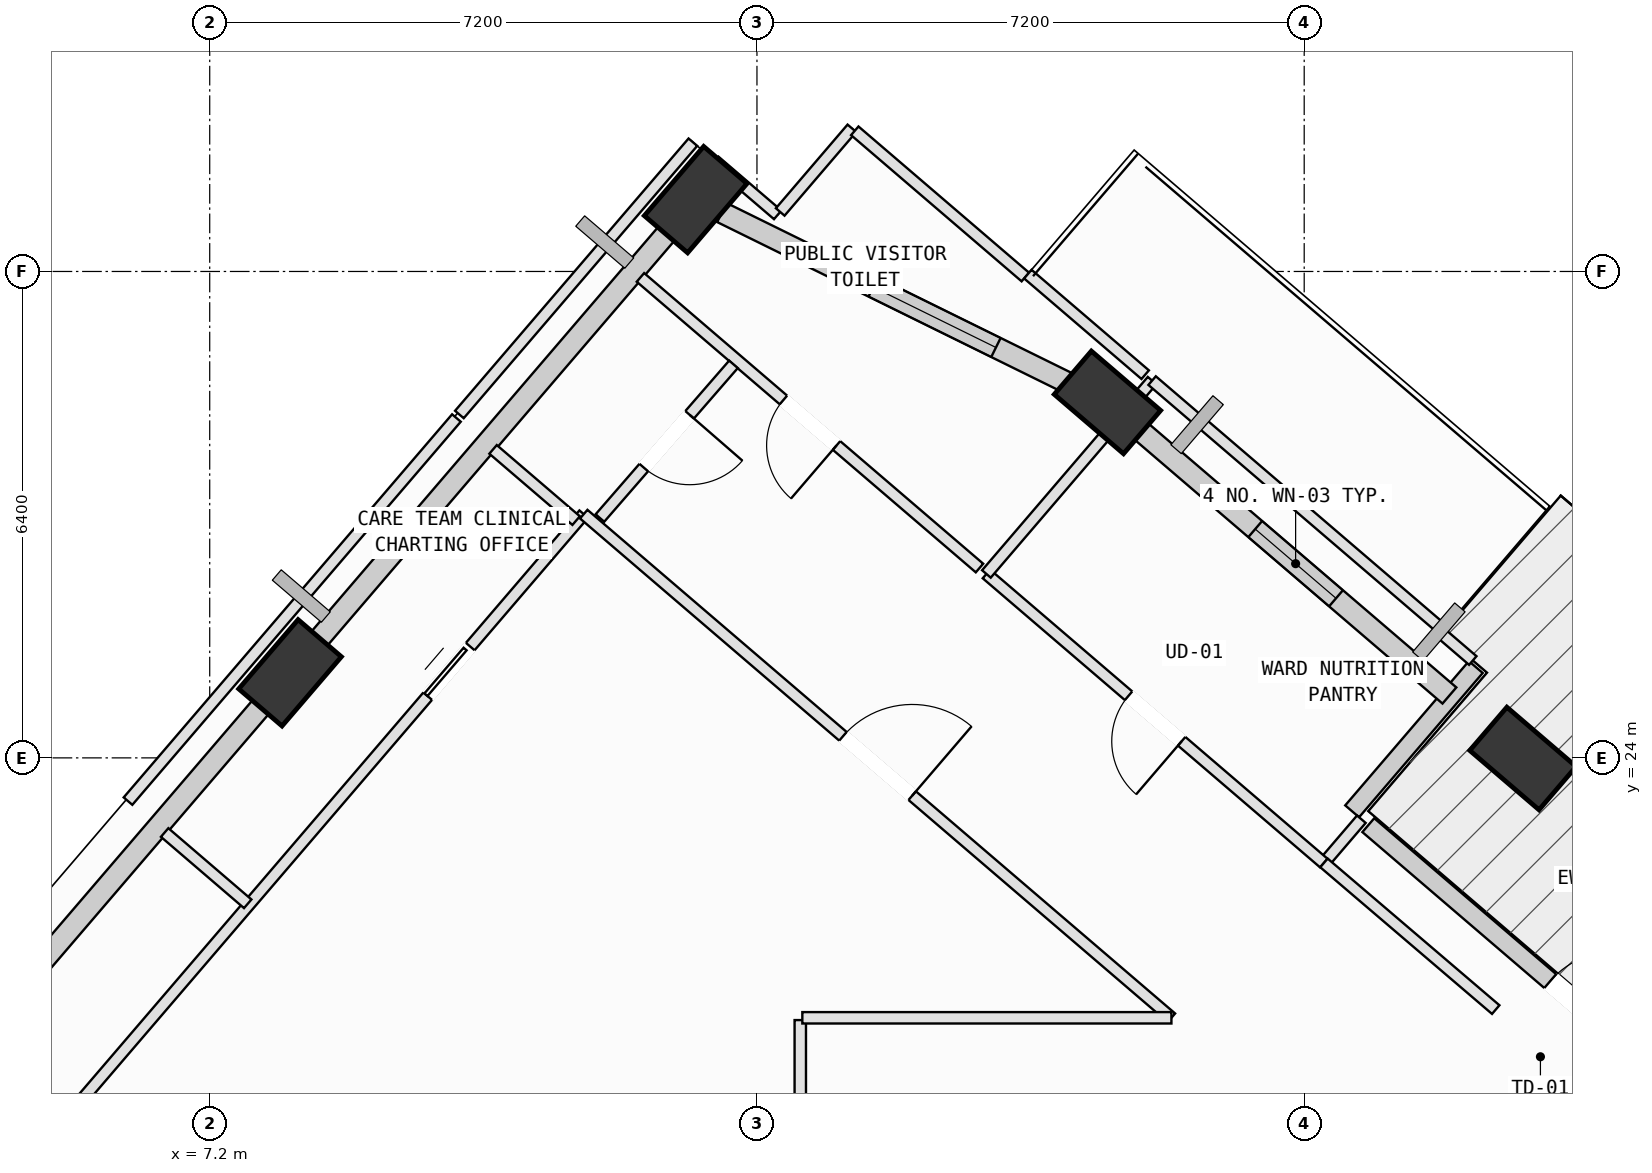
"""IFC4 building model, lengths in metres.
Left out: names, types, materials, properties, quantities, classifications, styles, units other than length and angle.
Written with IfcOpenShell. Run it as: python <this file> out.ifc"""

import sys

from ifc_helpers import new_model, si_unit, direction, frame, frame_2d, origin, origin_2d, place, context, subcontext, project, spatial, rectangle, extrude, element, fill, save


model = new_model("IFC4")
c1 = context("Model", 3, precision=1e-05, world=origin(), true_north=direction((0.0, 1.0)))
c2 = subcontext(c1, "Body", "Model", "MODEL_VIEW")
j1 = project(units=[si_unit("LENGTHUNIT", "METRE"), si_unit("PLANEANGLEUNIT", "RADIAN")], contexts=[c1])
p1 = place(None, origin())
s1 = spatial("IfcSite", under=j1, at=p1, CompositionType="ELEMENT")
p2 = place(p1, origin())
s2 = spatial("IfcBuilding", under=s1, at=p2, CompositionType="ELEMENT")
p3 = place(p2, frame((0.0, 0.0, 235.2)))
s3 = spatial("IfcBuildingStorey", under=s2, at=p3, CompositionType="ELEMENT", Elevation=235.2)
p4 = place(p3, frame((24.478, 23.992, 0.002), z_axis=(0.003662822632, -0.037788120151, 0.999279060976), x_axis=(-0.818469733864, 0.574018178548, 0.024706789453)))
e1 = element("IfcColumn", 1, at=p4, inside=s3, PredefinedType="COLUMN", context=c2, shape_type="SweptSolid", body=[
    extrude(rectangle(XDim=1.2, YDim=0.75, at=origin_2d()), origin(), (0.0, 0.0, 1.0), 3.999),
])
p5 = place(p3, frame((19.011, 28.677, 0.002), z_axis=(-0.015547819473, -0.060484066342, 0.998048066492), x_axis=(-0.573662062266, 0.81808320883, 0.040641133684)))
e2 = element("IfcColumn", 2, at=p5, inside=s3, PredefinedType="COLUMN", context=c2, shape_type="SweptSolid", body=[
    extrude(rectangle(XDim=1.2, YDim=0.75, at=origin_2d()), origin(), (0.0, 0.0, 1.0), 4.004),
])
p6 = place(p3, frame((13.594, 31.345, 0.002), z_axis=(-0.026352323059, -0.082830281023, 0.996215187404), x_axis=(0.849466173401, 0.523499420326, 0.065996796637)))
e3 = element("IfcColumn", 3, at=p6, inside=s3, PredefinedType="COLUMN", context=c2, shape_type="SweptSolid", body=[
    extrude(rectangle(XDim=1.2, YDim=0.75, at=origin_2d()), origin(), (0.0, 0.0, 1.0), 4.011),
])
p7 = place(p3, frame((8.257, 25.119, 0.002), z_axis=(-0.000425298844, -0.104441244629, 0.994530967613), x_axis=(0.653843741957, 0.752462548774, 0.079299897827)))
e4 = element("IfcColumn", 4, at=p7, inside=s3, PredefinedType="COLUMN", context=c2, shape_type="SweptSolid", body=[
    extrude(rectangle(XDim=1.2, YDim=0.75, at=origin_2d()), origin(), (0.0, 0.0, 1.0), 4.018),
])
p8 = place(p3, frame((22.444, 23.115, 0.0), z_axis=(0.0, 0.0, 1.0), x_axis=(0.759271458892, -0.650774040442, 0.0)))
e5 = element("IfcWall", 5, at=p8, inside=s3, PredefinedType="SOLIDWALL", context=c2, shape_type="SweptSolid", body=[
    extrude(rectangle(XDim=6.96, YDim=0.24, at=frame_2d((3.48, 0.0))), origin(), (0.0, 0.0, 1.0), 3.265),
])
p9 = place(p8, frame((3.152, 0.0, 0.0)))
e6 = element("IfcOpeningElement", 6, at=p9, cuts=e5, PredefinedType="OPENING", context=c2, shape_type="SweptSolid", body=[
    extrude(rectangle(XDim=1.1, YDim=2.15, at=frame_2d((0.55, 1.075))), frame((0.0, 0.13, 0.0), z_axis=(0.0, -1.0, 0.0), x_axis=(1.0, 0.0, 0.0)), (0.0, 0.0, 1.0), 0.26),
])
p10 = place(p3, frame((23.858, 25.195, 0.0), z_axis=(0.0, 0.0, 1.0), x_axis=(-0.650775288898, -0.759270388833, 0.0)))
e7 = element("IfcWall", 7, at=p10, inside=s3, PredefinedType="SOLIDWALL", context=c2, shape_type="SweptSolid", body=[
    extrude(rectangle(XDim=2.5, YDim=0.24, at=frame_2d((1.25, 0.0))), origin(), (0.0, 0.0, 1.0), 3.265),
])
p11 = place(p3, frame((19.343, 28.393, 0.0), z_axis=(0.0, 0.0, 1.0), x_axis=(0.759259741696, -0.650787710886, 0.0)))
e8 = element("IfcWall", 8, at=p11, inside=s3, PredefinedType="SOLIDWALL", context=c2, shape_type="SweptSolid", body=[
    extrude(rectangle(XDim=5.49, YDim=0.28, at=frame_2d((2.745, 0.0))), origin(), (0.0, 0.0, 1.0), 3.245),
])
p12 = place(p11, frame((2.124, 0.0, 0.75)))
e9 = element("IfcOpeningElement", 9, at=p12, cuts=e8, PredefinedType="OPENING", context=c2, shape_type="SweptSolid", body=[
    extrude(rectangle(XDim=1.4, YDim=1.85, at=frame_2d((0.7, 0.925))), frame((0.0, 0.15, 0.0), z_axis=(0.0, -1.0, 0.0), x_axis=(1.0, 0.0, 0.0)), (0.0, 0.0, 1.0), 0.3),
])
p13 = place(p3, frame((13.938, 31.176, 0.0), z_axis=(0.0, 0.0, 1.0), x_axis=(0.89710891672, -0.441809451621, 0.0)))
e10 = element("IfcWall", 10, at=p13, inside=s3, PredefinedType="SOLIDWALL", context=c2, shape_type="SweptSolid", body=[
    extrude(rectangle(XDim=5.303, YDim=0.28, at=frame_2d((2.651, 0.0))), origin(), (0.0, 0.0, 1.0), 3.265),
])
p14 = place(p13, frame((2.22, 0.0, 0.75)))
e11 = element("IfcOpeningElement", 11, at=p14, cuts=e10, PredefinedType="OPENING", context=c2, shape_type="SweptSolid", body=[
    extrude(rectangle(XDim=1.8, YDim=2.05, at=frame_2d((0.9, 1.025))), frame((0.0, 0.15, 0.0), z_axis=(0.0, -1.0, 0.0), x_axis=(1.0, 0.0, 0.0)), (0.0, 0.0, 1.0), 0.3),
])
p15 = place(p3, frame((8.396, 25.281, 0.0), z_axis=(0.0, 0.0, 1.0), x_axis=(0.650769737018, 0.759275147349, 0.0)))
e12 = element("IfcWall", 12, at=p15, inside=s3, PredefinedType="SOLIDWALL", context=c2, shape_type="SweptSolid", body=[
    extrude(rectangle(XDim=7.434, YDim=0.28, at=frame_2d((3.717, 0.0))), origin(), (0.0, 0.0, 1.0), 3.265),
])
p16 = place(p3, frame((3.039, 19.031, 0.0), z_axis=(0.0, 0.0, 1.0), x_axis=(0.650777942078, 0.759268114769, 0.0)))
e13 = element("IfcWall", 13, at=p16, inside=s3, PredefinedType="SOLIDWALL", context=c2, shape_type="SweptSolid", body=[
    extrude(rectangle(XDim=7.485, YDim=0.28, at=frame_2d((3.742, 0.0))), origin(), (0.0, 0.0, 1.0), 3.265),
])
p17 = place(p3, frame((14.97, 20.55, 0.0), z_axis=(0.0, 0.0, 1.0), x_axis=(0.0, -1.0, 0.0)))
e14 = element("IfcWall", 14, at=p17, inside=s3, PredefinedType="PARTITIONING", context=c2, shape_type="SweptSolid", body=[
    extrude(rectangle(XDim=2.32, YDim=0.15, at=frame_2d((1.16, 0.0))), origin(), (0.0, 0.0, 1.0), 3.78),
])
p18 = place(p3, frame((3.485, 17.131, 0.0), z_axis=(0.0, 0.0, 1.0), x_axis=(0.650768647055, 0.759276081548, 0.0)))
e15 = element("IfcWall", 15, at=p18, inside=s3, PredefinedType="PARTITIONING", context=c2, shape_type="SweptSolid", body=[
    extrude(rectangle(XDim=13.271, YDim=0.15, at=frame_2d((6.635, 0.0))), origin(), (0.0, 0.0, 1.0), 3.78),
])
p19 = place(p18, frame((10.116, 0.0, 0.0)))
e16 = element("IfcOpeningElement", 16, at=p19, cuts=e15, PredefinedType="OPENING", context=c2, shape_type="SweptSolid", body=[
    extrude(rectangle(XDim=0.86, YDim=2.06, at=frame_2d((0.43, 1.03))), frame((0.0, 0.085, 0.0), z_axis=(0.0, -1.0, 0.0), x_axis=(1.0, 0.0, 0.0)), (0.0, 0.0, 1.0), 0.17),
])
p20 = place(p3, frame((12.121, 27.207, 0.0), z_axis=(0.0, 0.0, 1.0), x_axis=(0.759276909928, -0.650767680552, 0.0)))
e17 = element("IfcWall", 17, at=p20, inside=s3, PredefinedType="PARTITIONING", context=c2, shape_type="SweptSolid", body=[
    extrude(rectangle(XDim=10.183, YDim=0.15, at=frame_2d((5.092, 0.0))), origin(), (0.0, 0.0, 1.0), 3.78),
])
p21 = place(p20, frame((4.492, 0.0, 0.0)))
e18 = element("IfcOpeningElement", 18, at=p21, cuts=e17, PredefinedType="OPENING", context=c2, shape_type="SweptSolid", body=[
    extrude(rectangle(XDim=1.2, YDim=2.15, at=frame_2d((0.6, 1.075))), frame((0.0, 0.085, 0.0), z_axis=(0.0, -1.0, 0.0), x_axis=(1.0, 0.0, 0.0)), (0.0, 0.0, 1.0), 0.17),
])
p22 = place(p3, frame((19.853, 20.58, 0.0), z_axis=(0.0, 0.0, 1.0), x_axis=(-1.0, 0.0, 0.0)))
e19 = element("IfcWall", 19, at=p22, inside=s3, PredefinedType="PARTITIONING", context=c2, shape_type="SweptSolid", body=[
    extrude(rectangle(XDim=4.856, YDim=0.15, at=frame_2d((2.428, 0.0))), origin(), (0.0, 0.0, 1.0), 3.78),
])
p23 = place(p3, frame((22.352, 23.193, 0.0), z_axis=(0.0, 0.0, 1.0), x_axis=(-0.650367875371, -0.759619395938, 0.0)))
e20 = element("IfcWall", 20, at=p23, inside=s3, PredefinedType="PARTITIONING", context=c2, shape_type="SweptSolid", body=[
    extrude(rectangle(XDim=0.76, YDim=0.15, at=frame_2d((0.38, 0.0))), origin(), (0.0, 0.0, 1.0), 3.78),
])
p24 = place(p3, frame((21.858, 22.616, 0.0), z_axis=(0.0, 0.0, 1.0), x_axis=(-0.759330296465, 0.650705387153, 0.0)))
e21 = element("IfcWall", 21, at=p24, inside=s3, PredefinedType="PARTITIONING", context=c2, shape_type="SweptSolid", body=[
    extrude(rectangle(XDim=5.846, YDim=0.15, at=frame_2d((2.923, 0.0))), origin(), (0.0, 0.0, 1.0), 3.78),
])
p25 = place(p24, frame((2.463, 0.0, 0.0)))
e22 = element("IfcOpeningElement", 22, at=p25, cuts=e21, PredefinedType="OPENING", context=c2, shape_type="SweptSolid", body=[
    extrude(rectangle(XDim=0.92, YDim=2.1, at=frame_2d((0.46, 1.05))), frame((0.0, 0.085, 0.0), z_axis=(0.0, -1.0, 0.0), x_axis=(1.0, 0.0, 0.0)), (0.0, 0.0, 1.0), 0.17),
])
p26 = place(p3, frame((17.419, 26.42, 0.0), z_axis=(0.0, 0.0, 1.0), x_axis=(0.65069535629, 0.759338892262, 0.0)))
e23 = element("IfcWall", 23, at=p26, inside=s3, PredefinedType="PARTITIONING", context=c2, shape_type="SweptSolid", body=[
    extrude(rectangle(XDim=3.351, YDim=0.15, at=frame_2d((1.675, 0.0))), origin(), (0.0, 0.0, 1.0), 3.78),
])
p27 = place(p3, frame((19.599, 28.964, 0.0), z_axis=(0.0, 0.0, 1.0), x_axis=(0.759195122693, -0.650863092885, 0.0)))
e24 = element("IfcWall", 24, at=p27, inside=s3, PredefinedType="PARTITIONING", context=c2, shape_type="SweptSolid", body=[
    extrude(rectangle(XDim=5.046, YDim=0.15, at=frame_2d((2.523, 0.0))), origin(), (0.0, 0.0, 1.0), 3.78),
])
p28 = place(p3, frame((23.398, 25.642, 0.0), z_axis=(0.0, 0.0, 1.0), x_axis=(0.758416079411, -0.651770703922, 0.0)))
e25 = element("IfcWall", 25, at=p28, inside=s3, PredefinedType="PARTITIONING", context=c2, shape_type="SweptSolid", body=[
    extrude(rectangle(XDim=0.554, YDim=0.15, at=frame_2d((0.277, 0.0))), origin(), (0.0, 0.0, 1.0), 3.78),
])
p29 = place(p3, frame((17.328, 26.498, 0.0), z_axis=(0.0, 0.0, 1.0), x_axis=(-0.759230204276, 0.650822169963, 0.0)))
e26 = element("IfcWall", 26, at=p29, inside=s3, PredefinedType="PARTITIONING", context=c2, shape_type="SweptSolid", body=[
    extrude(rectangle(XDim=5.875, YDim=0.15, at=frame_2d((2.938, 0.0))), origin(), (0.0, 0.0, 1.0), 3.78),
])
p30 = place(p29, frame((2.478, 0.0, 0.0)))
e27 = element("IfcOpeningElement", 27, at=p30, cuts=e26, PredefinedType="OPENING", context=c2, shape_type="SweptSolid", body=[
    extrude(rectangle(XDim=0.92, YDim=2.1, at=frame_2d((0.46, 1.05))), frame((0.0, 0.085, 0.0), z_axis=(0.0, -1.0, 0.0), x_axis=(1.0, 0.0, 0.0)), (0.0, 0.0, 1.0), 0.17),
])
p31 = place(p3, frame((13.09, 31.05, 0.0), z_axis=(0.0, 0.0, 1.0), x_axis=(0.650499387812, 0.759506778413, 0.0)))
e28 = element("IfcWall", 28, at=p31, inside=s3, PredefinedType="PARTITIONING", context=c2, shape_type="SweptSolid", body=[
    extrude(rectangle(XDim=1.102, YDim=0.15, at=frame_2d((0.551, 0.0))), origin(), (0.0, 0.0, 1.0), 3.265),
])
p32 = place(p3, frame((13.845, 31.854, 0.0), z_axis=(0.0, 0.0, 1.0), x_axis=(0.759635869727, -0.650348633752, 0.0)))
e29 = element("IfcWall", 29, at=p32, inside=s3, PredefinedType="PARTITIONING", context=c2, shape_type="SweptSolid", body=[
    extrude(rectangle(XDim=1.09, YDim=0.15, at=frame_2d((0.545, 0.0))), origin(), (0.0, 0.0, 1.0), 3.78),
])
p33 = place(p3, frame((14.706, 31.183, 0.0), z_axis=(0.0, 0.0, 1.0), x_axis=(0.650513900011, 0.759494348822, 0.0)))
e30 = element("IfcWall", 30, at=p33, inside=s3, PredefinedType="PARTITIONING", context=c2, shape_type="SweptSolid", body=[
    extrude(rectangle(XDim=1.449, YDim=0.15, at=frame_2d((0.725, 0.0))), origin(), (0.0, 0.0, 1.0), 3.78),
])
p34 = place(p3, frame((15.687, 32.251, 0.0), z_axis=(0.0, 0.0, 1.0), x_axis=(0.759134153422, -0.650934203364, 0.0)))
e31 = element("IfcWall", 31, at=p34, inside=s3, PredefinedType="PARTITIONING", context=c2, shape_type="SweptSolid", body=[
    extrude(rectangle(XDim=2.956, YDim=0.15, at=frame_2d((1.478, 0.0))), origin(), (0.0, 0.0, 1.0), 3.78),
])
p35 = place(p3, frame((17.964, 30.365, 0.0), z_axis=(0.0, 0.0, 1.0), x_axis=(0.759349828731, -0.650682593594, 0.0)))
e32 = element("IfcWall", 32, at=p35, inside=s3, PredefinedType="PARTITIONING", context=c2, shape_type="SweptSolid", body=[
    extrude(rectangle(XDim=2.033, YDim=0.15, at=frame_2d((1.017, 0.0))), origin(), (0.0, 0.0, 1.0), 3.78),
])
p36 = place(p3, frame((6.125, 23.431, 0.0), z_axis=(0.0, 0.0, 1.0), x_axis=(0.650806514247, 0.759243624282, 0.0)))
e33 = element("IfcWall", 33, at=p36, inside=s3, PredefinedType="PARTITIONING", context=c2, shape_type="SweptSolid", body=[
    extrude(rectangle(XDim=6.639, YDim=0.15, at=frame_2d((3.32, 0.0))), origin(), (0.0, 0.0, 1.0), 3.78),
])
p37 = place(p3, frame((10.928, 28.059, 0.0), z_axis=(0.0, 0.0, 1.0), x_axis=(0.759208718958, -0.650847233272, 0.0)))
e34 = element("IfcWall", 34, at=p37, inside=s3, PredefinedType="PARTITIONING", context=c2, shape_type="SweptSolid", body=[
    extrude(rectangle(XDim=1.44, YDim=0.15, at=frame_2d((0.72, 0.0))), origin(), (0.0, 0.0, 1.0), 3.78),
])
p38 = place(p3, frame((7.7, 22.08, 0.0), z_axis=(0.0, 0.0, 1.0), x_axis=(-0.758873589229, 0.65123795618, 0.0)))
e35 = element("IfcWall", 35, at=p38, inside=s3, PredefinedType="PARTITIONING", context=c2, shape_type="SweptSolid", body=[
    extrude(rectangle(XDim=1.44, YDim=0.15, at=frame_2d((0.72, 0.0))), origin(), (0.0, 0.0, 1.0), 3.78),
])
p39 = place(p3, frame((10.485, 28.518, 0.0), z_axis=(0.0, 0.0, 1.0), x_axis=(0.650868052395, 0.759190870843, 0.0)))
e36 = element("IfcWall", 36, at=p39, inside=s3, PredefinedType="PARTITIONING", context=c2, shape_type="SweptSolid", body=[
    extrude(rectangle(XDim=4.719, YDim=0.15, at=frame_2d((2.36, 0.0))), origin(), (0.0, 0.0, 1.0), 3.78),
])
p40 = place(p3, frame((21.86, 22.618, 0.0), z_axis=(0.0, 0.0, 1.0), x_axis=(0.760455656474, -0.649389863285, 0.0)))
e37 = element("IfcWall", 37, at=p40, inside=s3, PredefinedType="PARTITIONING", context=c2, shape_type="SweptSolid", body=[
    extrude(rectangle(XDim=2.972, YDim=0.15, at=frame_2d((1.486, 0.0))), origin(), (0.0, 0.0, 1.0), 3.78),
])
p41 = place(p3, frame((14.091, 29.178, 0.0), z_axis=(0.0, 0.0, 1.0), x_axis=(-0.655932730302, -0.754819351447, 0.0)))
e38 = element("IfcWall", 38, at=p41, inside=s3, PredefinedType="PARTITIONING", context=c2, shape_type="SweptSolid", body=[
    extrude(rectangle(XDim=2.679, YDim=0.15, at=frame_2d((1.339, 0.0))), origin(), (0.0, 0.0, 1.0), 3.78),
])
p42 = place(p41, frame((0.879, 0.0, 0.0)))
e39 = element("IfcOpeningElement", 39, at=p42, cuts=e38, PredefinedType="OPENING", context=c2, shape_type="SweptSolid", body=[
    extrude(rectangle(XDim=0.92, YDim=2.1, at=frame_2d((0.46, 1.05))), frame((0.0, 0.085, 0.0), z_axis=(0.0, -1.0, 0.0), x_axis=(1.0, 0.0, 0.0)), (0.0, 0.0, 1.0), 0.17),
])
p43 = place(p9, origin())
e40 = element("IfcDoor", 40, at=p43, inside=s3, OperationType="SINGLE_SWING_RIGHT", PredefinedType="DOOR", context=c2, shape_type="SweptSolid", body=[
    extrude(rectangle(XDim=1.1, YDim=2.15, at=frame_2d((0.55, 1.075))), frame((0.0, 0.025, 0.0), z_axis=(0.0, -1.0, 0.0), x_axis=(1.0, 0.0, 0.0)), (0.0, 0.0, 1.0), 0.05),
])
fill(e6, e40)
p44 = place(p12, origin())
e41 = element("IfcWindow", 41, at=p44, inside=s3, PartitioningType="SINGLE_PANEL", PredefinedType="WINDOW", context=c2, shape_type="SweptSolid", body=[
    extrude(rectangle(XDim=1.4, YDim=1.85, at=frame_2d((0.7, 0.925))), frame((0.0, 0.03, 0.0), z_axis=(0.0, -1.0, 0.0), x_axis=(1.0, 0.0, 0.0)), (0.0, 0.0, 1.0), 0.06),
])
fill(e9, e41)
p45 = place(p14, origin())
e42 = element("IfcWindow", 42, at=p45, inside=s3, PartitioningType="SINGLE_PANEL", PredefinedType="WINDOW", context=c2, shape_type="SweptSolid", body=[
    extrude(rectangle(XDim=1.8, YDim=2.05, at=frame_2d((0.9, 1.025))), frame((0.0, 0.03, 0.0), z_axis=(0.0, -1.0, 0.0), x_axis=(1.0, 0.0, 0.0)), (0.0, 0.0, 1.0), 0.06),
])
fill(e11, e42)
p46 = place(p21, origin())
e43 = element("IfcDoor", 43, at=p46, inside=s3, OperationType="SINGLE_SWING_RIGHT", PredefinedType="DOOR", context=c2, shape_type="SweptSolid", body=[
    extrude(rectangle(XDim=1.2, YDim=2.15, at=frame_2d((0.6, 1.075))), frame((0.0, 0.025, 0.0), z_axis=(0.0, -1.0, 0.0), x_axis=(1.0, 0.0, 0.0)), (0.0, 0.0, 1.0), 0.05),
])
fill(e18, e43)
p47 = place(p25, origin())
e44 = element("IfcDoor", 44, at=p47, inside=s3, OperationType="SINGLE_SWING_LEFT", PredefinedType="DOOR", context=c2, shape_type="SweptSolid", body=[
    extrude(rectangle(XDim=0.92, YDim=2.1, at=frame_2d((0.46, 1.05))), frame((0.0, 0.025, 0.0), z_axis=(0.0, -1.0, 0.0), x_axis=(1.0, 0.0, 0.0)), (0.0, 0.0, 1.0), 0.05),
])
fill(e22, e44)
p48 = place(p30, origin())
e45 = element("IfcDoor", 45, at=p48, inside=s3, OperationType="SINGLE_SWING_LEFT", PredefinedType="DOOR", context=c2, shape_type="SweptSolid", body=[
    extrude(rectangle(XDim=0.92, YDim=2.1, at=frame_2d((0.46, 1.05))), frame((0.0, 0.025, 0.0), z_axis=(0.0, -1.0, 0.0), x_axis=(1.0, 0.0, 0.0)), (0.0, 0.0, 1.0), 0.05),
])
fill(e27, e45)
p49 = place(p42, origin())
e46 = element("IfcDoor", 46, at=p49, inside=s3, OperationType="SINGLE_SWING_LEFT", PredefinedType="DOOR", context=c2, shape_type="SweptSolid", body=[
    extrude(rectangle(XDim=0.92, YDim=2.1, at=frame_2d((0.46, 1.05))), frame((0.0, 0.025, 0.0), z_axis=(0.0, -1.0, 0.0), x_axis=(1.0, 0.0, 0.0)), (0.0, 0.0, 1.0), 0.05),
])
fill(e39, e46)
p50 = place(p19, origin())
e47 = element("IfcDoor", 47, at=p50, inside=s3, OperationType="SLIDING_TO_LEFT", PredefinedType="DOOR", context=c2, shape_type="SweptSolid", body=[
    extrude(rectangle(XDim=0.86, YDim=2.06, at=frame_2d((0.43, 1.03))), frame((0.0, 0.025, 0.0), z_axis=(0.0, -1.0, 0.0), x_axis=(1.0, 0.0, 0.0)), (0.0, 0.0, 1.0), 0.05),
])
fill(e16, e47)
save(model, sys.argv[1])
